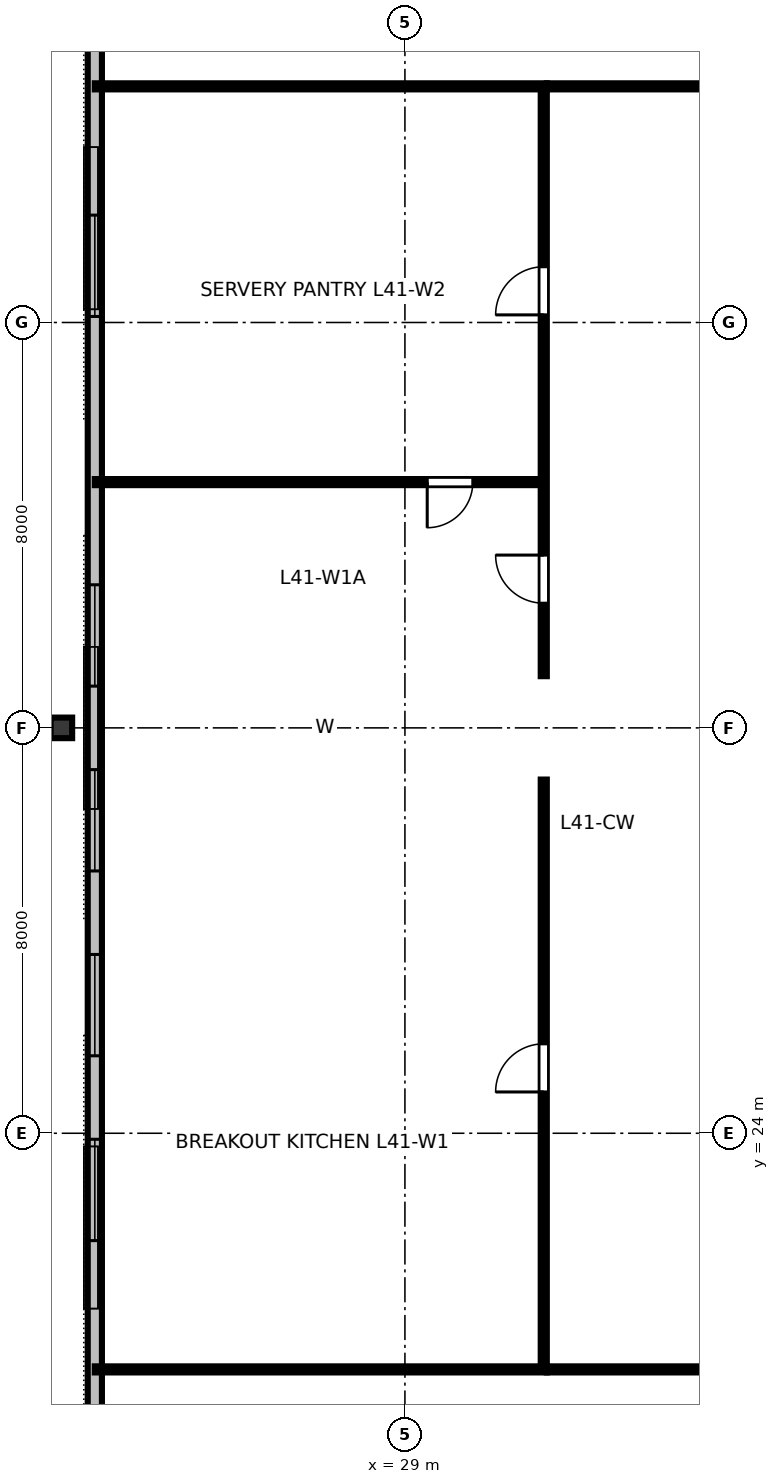
"""IFC4 building model, lengths in metres.
Left out: names, types, materials, properties, quantities, classifications, styles, units other than length and angle.
Written with IfcOpenShell. Run it as: python <this file> out.ifc"""

import sys

from ifc_helpers import new_model, si_unit, direction, frame, frame_2d, origin, origin_2d, place, context, subcontext, project, spatial, rectangle, i_section, extrude, element, fill, save


model = new_model("IFC4")
c1 = context("Model", 3, precision=1e-05, world=origin(), true_north=direction((0.0, 1.0)))
c2 = subcontext(c1, "Body", "Model", "MODEL_VIEW")
j1 = project(units=[si_unit("LENGTHUNIT", "METRE"), si_unit("PLANEANGLEUNIT", "RADIAN")], contexts=[c1])
p1 = place(None, origin())
s1 = spatial("IfcSite", under=j1, at=p1, CompositionType="ELEMENT")
p2 = place(p1, origin())
s2 = spatial("IfcBuilding", under=s1, at=p2, CompositionType="ELEMENT")
p3 = place(p2, frame((0.0, 0.0, 156.4)))
s3 = spatial("IfcBuildingStorey", under=s2, at=p3, CompositionType="ELEMENT", Elevation=156.4)
p4 = place(p3, frame((22.22, 32.0, 0.0), z_axis=(-0.088994797504, 0.0, 0.996032090857), x_axis=(0.996032090857, 0.0, 0.088994797504)))
e1 = element("IfcColumn", 1, at=p4, inside=s3, PredefinedType="COLUMN", context=c2, shape_type="SweptSolid", body=[
    extrude(i_section(OverallWidth=0.406, OverallDepth=0.425, WebThickness=0.033, FlangeThickness=0.052, FilletRadius=0.025, at=origin_2d()), origin(), (0.0, 0.0, 1.0), 3.372),
])
p5 = place(p3, frame((22.88, 47.69, 0.0), z_axis=(0.0, 0.0, 1.0), x_axis=(0.0, -1.0, 0.0)))
e2 = element("IfcWall", 2, at=p5, inside=s3, PredefinedType="STANDARD", context=c2, shape_type="SweptSolid", body=[
    extrude(rectangle(XDim=31.38, YDim=0.28, at=frame_2d((15.69, 0.0))), origin(), (0.0, 0.0, 1.0), 3.36),
])
p6 = place(p5, frame((5.571, 0.0, 0.8)))
e3 = element("IfcOpeningElement", 3, at=p6, cuts=e2, PredefinedType="OPENING", context=c2, shape_type="SweptSolid", body=[
    extrude(rectangle(XDim=2.0, YDim=1.95, at=frame_2d((1.0, 0.975))), frame((0.0, 0.15, 0.0), z_axis=(0.0, -1.0, 0.0), x_axis=(1.0, 0.0, 0.0)), (0.0, 0.0, 1.0), 0.3),
])
p7 = place(p5, frame((12.866, 0.0, 0.8)))
e4 = element("IfcOpeningElement", 4, at=p7, cuts=e2, PredefinedType="OPENING", context=c2, shape_type="SweptSolid", body=[
    extrude(rectangle(XDim=2.0, YDim=1.95, at=frame_2d((1.0, 0.975))), frame((0.0, 0.15, 0.0), z_axis=(0.0, -1.0, 0.0), x_axis=(1.0, 0.0, 0.0)), (0.0, 0.0, 1.0), 0.3),
])
p8 = place(p5, frame((16.514, 0.0, 0.8)))
e5 = element("IfcOpeningElement", 5, at=p8, cuts=e2, PredefinedType="OPENING", context=c2, shape_type="SweptSolid", body=[
    extrude(rectangle(XDim=2.0, YDim=1.95, at=frame_2d((1.0, 0.975))), frame((0.0, 0.15, 0.0), z_axis=(0.0, -1.0, 0.0), x_axis=(1.0, 0.0, 0.0)), (0.0, 0.0, 1.0), 0.3),
])
p9 = place(p5, frame((20.161, 0.0, 0.8)))
e6 = element("IfcOpeningElement", 6, at=p9, cuts=e2, PredefinedType="OPENING", context=c2, shape_type="SweptSolid", body=[
    extrude(rectangle(XDim=2.0, YDim=1.95, at=frame_2d((1.0, 0.975))), frame((0.0, 0.15, 0.0), z_axis=(0.0, -1.0, 0.0), x_axis=(1.0, 0.0, 0.0)), (0.0, 0.0, 1.0), 0.3),
])
p10 = place(p5, frame((23.809, 0.0, 0.8)))
e7 = element("IfcOpeningElement", 7, at=p10, cuts=e2, PredefinedType="OPENING", context=c2, shape_type="SweptSolid", body=[
    extrude(rectangle(XDim=2.0, YDim=1.95, at=frame_2d((1.0, 0.975))), frame((0.0, 0.15, 0.0), z_axis=(0.0, -1.0, 0.0), x_axis=(1.0, 0.0, 0.0)), (0.0, 0.0, 1.0), 0.3),
])
p11 = place(p3, frame((31.8, 19.34, 0.0), z_axis=(0.0, 0.0, 1.0), x_axis=(1.0, 0.0, 0.0)))
e8 = element("IfcWall", 8, at=p11, inside=s3, PredefinedType="PARTITIONING", context=c2, shape_type="SweptSolid", body=[
    extrude(rectangle(XDim=28.4, YDim=0.12, at=frame_2d((14.2, 0.0))), origin(), (0.0, 0.0, 1.0), 2.64),
])
p12 = place(p11, frame((4.789, 0.0, 0.0)))
e9 = element("IfcOpeningElement", 9, at=p12, cuts=e8, PredefinedType="OPENING", context=c2, shape_type="SweptSolid", body=[
    extrude(rectangle(XDim=0.95, YDim=2.15, at=frame_2d((0.475, 1.075))), frame((0.0, 0.07, 0.0), z_axis=(0.0, -1.0, 0.0), x_axis=(1.0, 0.0, 0.0)), (0.0, 0.0, 1.0), 0.14),
])
p13 = place(p11, frame((12.708, 0.0, 0.0)))
e10 = element("IfcOpeningElement", 10, at=p13, cuts=e8, PredefinedType="OPENING", context=c2, shape_type="SweptSolid", body=[
    extrude(rectangle(XDim=0.95, YDim=2.15, at=frame_2d((0.475, 1.075))), frame((0.0, 0.07, 0.0), z_axis=(0.0, -1.0, 0.0), x_axis=(1.0, 0.0, 0.0)), (0.0, 0.0, 1.0), 0.14),
])
p14 = place(p11, frame((21.645, 0.0, 0.0)))
e11 = element("IfcOpeningElement", 11, at=p14, cuts=e8, PredefinedType="OPENING", context=c2, shape_type="SweptSolid", body=[
    extrude(rectangle(XDim=0.95, YDim=2.15, at=frame_2d((0.475, 1.075))), frame((0.0, 0.07, 0.0), z_axis=(0.0, -1.0, 0.0), x_axis=(1.0, 0.0, 0.0)), (0.0, 0.0, 1.0), 0.14),
])
p15 = place(p3, frame((31.8, 44.66, 0.0), z_axis=(0.0, 0.0, 1.0), x_axis=(1.0, 0.0, 0.0)))
e12 = element("IfcWall", 12, at=p15, inside=s3, PredefinedType="PARTITIONING", context=c2, shape_type="SweptSolid", body=[
    extrude(rectangle(XDim=28.4, YDim=0.12, at=frame_2d((14.2, 0.0))), origin(), (0.0, 0.0, 1.0), 2.64),
])
p16 = place(p15, frame((4.036, 0.0, 0.0)))
e13 = element("IfcOpeningElement", 13, at=p16, cuts=e12, PredefinedType="OPENING", context=c2, shape_type="SweptSolid", body=[
    extrude(rectangle(XDim=0.95, YDim=2.15, at=frame_2d((0.475, 1.075))), frame((0.0, 0.07, 0.0), z_axis=(0.0, -1.0, 0.0), x_axis=(1.0, 0.0, 0.0)), (0.0, 0.0, 1.0), 0.14),
])
p17 = place(p15, frame((12.256, 0.0, 0.0)))
e14 = element("IfcOpeningElement", 14, at=p17, cuts=e12, PredefinedType="OPENING", context=c2, shape_type="SweptSolid", body=[
    extrude(rectangle(XDim=0.95, YDim=2.15, at=frame_2d((0.475, 1.075))), frame((0.0, 0.07, 0.0), z_axis=(0.0, -1.0, 0.0), x_axis=(1.0, 0.0, 0.0)), (0.0, 0.0, 1.0), 0.14),
])
p18 = place(p15, frame((18.246, 0.0, 0.0)))
e15 = element("IfcOpeningElement", 15, at=p18, cuts=e12, PredefinedType="OPENING", context=c2, shape_type="SweptSolid", body=[
    extrude(rectangle(XDim=0.95, YDim=2.15, at=frame_2d((0.475, 1.075))), frame((0.0, 0.07, 0.0), z_axis=(0.0, -1.0, 0.0), x_axis=(1.0, 0.0, 0.0)), (0.0, 0.0, 1.0), 0.14),
])
p19 = place(p15, frame((24.086, 0.0, 0.0)))
e16 = element("IfcOpeningElement", 16, at=p19, cuts=e12, PredefinedType="OPENING", context=c2, shape_type="SweptSolid", body=[
    extrude(rectangle(XDim=0.95, YDim=2.15, at=frame_2d((0.475, 1.075))), frame((0.0, 0.07, 0.0), z_axis=(0.0, -1.0, 0.0), x_axis=(1.0, 0.0, 0.0)), (0.0, 0.0, 1.0), 0.14),
])
p20 = place(p3, frame((31.74, 36.85, 0.0), z_axis=(0.0, 0.0, 1.0), x_axis=(-1.0, 0.0, 0.0)))
e17 = element("IfcWall", 17, at=p20, inside=s3, PredefinedType="PARTITIONING", context=c2, shape_type="SweptSolid", body=[
    extrude(rectangle(XDim=8.86, YDim=0.12, at=frame_2d((4.43, 0.0))), origin(), (0.0, 0.0, 1.0), 2.64),
])
p21 = place(p20, frame((1.4, 0.0, 0.0)))
e18 = element("IfcOpeningElement", 18, at=p21, cuts=e17, PredefinedType="OPENING", context=c2, shape_type="SweptSolid", body=[
    extrude(rectangle(XDim=0.9, YDim=2.15, at=frame_2d((0.45, 1.075))), frame((0.0, 0.07, 0.0), z_axis=(0.0, -1.0, 0.0), x_axis=(1.0, 0.0, 0.0)), (0.0, 0.0, 1.0), 0.14),
])
p22 = place(p3, frame((31.74, 19.4, 0.0), z_axis=(0.0, 0.0, 1.0), x_axis=(0.0, 1.0, 0.0)))
e19 = element("IfcWall", 19, at=p22, inside=s3, PredefinedType="PARTITIONING", context=c2, shape_type="SweptSolid", body=[
    extrude(rectangle(XDim=11.58, YDim=0.12, at=frame_2d((5.79, 0.0))), origin(), (0.0, 0.0, 1.0), 2.64),
])
p23 = place(p22, frame((5.415, 0.0, 0.0)))
e20 = element("IfcOpeningElement", 20, at=p23, cuts=e19, PredefinedType="OPENING", context=c2, shape_type="SweptSolid", body=[
    extrude(rectangle(XDim=0.95, YDim=2.15, at=frame_2d((0.475, 1.075))), frame((0.0, 0.07, 0.0), z_axis=(0.0, -1.0, 0.0), x_axis=(1.0, 0.0, 0.0)), (0.0, 0.0, 1.0), 0.14),
])
p24 = place(p3, frame((31.74, 33.02, 0.0), z_axis=(0.0, 0.0, 1.0), x_axis=(0.0, 1.0, 0.0)))
e21 = element("IfcWall", 21, at=p24, inside=s3, PredefinedType="PARTITIONING", context=c2, shape_type="SweptSolid", body=[
    extrude(rectangle(XDim=11.58, YDim=0.12, at=frame_2d((5.79, 0.0))), origin(), (0.0, 0.0, 1.0), 2.64),
])
p25 = place(p24, frame((1.44, 0.0, 0.0)))
e22 = element("IfcOpeningElement", 22, at=p25, cuts=e21, PredefinedType="OPENING", context=c2, shape_type="SweptSolid", body=[
    extrude(rectangle(XDim=0.95, YDim=2.15, at=frame_2d((0.475, 1.075))), frame((0.0, 0.07, 0.0), z_axis=(0.0, -1.0, 0.0), x_axis=(1.0, 0.0, 0.0)), (0.0, 0.0, 1.0), 0.14),
])
p26 = place(p24, frame((7.13, 0.0, 0.0)))
e23 = element("IfcOpeningElement", 23, at=p26, cuts=e21, PredefinedType="OPENING", context=c2, shape_type="SweptSolid", body=[
    extrude(rectangle(XDim=0.95, YDim=2.15, at=frame_2d((0.475, 1.075))), frame((0.0, 0.07, 0.0), z_axis=(0.0, -1.0, 0.0), x_axis=(1.0, 0.0, 0.0)), (0.0, 0.0, 1.0), 0.14),
])
for number, where, z_axis, x_axis in (
    (24, (31.8, 19.34, 0.0), (0.0, 0.0, 1.0), (-1.0, 0.0, 0.0)),
    (25, (31.8, 44.66, 0.0), (0.0, 0.0, 1.0), (-1.0, 0.0, 0.0)),
):
    element("IfcWall", number, at=place(p3, frame(where, z_axis=z_axis, x_axis=x_axis)), inside=s3, PredefinedType="PARTITIONING", context=c2, shape_type="SweptSolid", body=[
        extrude(rectangle(XDim=8.92, YDim=0.12, at=frame_2d((4.46, 0.0))), origin(), (0.0, 0.0, 1.0), 2.64),
    ])
p27 = place(p6, origin())
e26 = element("IfcWindow", 26, at=p27, inside=s3, PartitioningType="SINGLE_PANEL", PredefinedType="WINDOW", context=c2, shape_type="SweptSolid", body=[
    extrude(rectangle(XDim=2.0, YDim=1.95, at=frame_2d((1.0, 0.975))), frame((0.0, 0.03, 0.0), z_axis=(0.0, -1.0, 0.0), x_axis=(1.0, 0.0, 0.0)), (0.0, 0.0, 1.0), 0.06),
])
fill(e3, e26)
p28 = place(p7, origin())
e27 = element("IfcWindow", 27, at=p28, inside=s3, PartitioningType="SINGLE_PANEL", PredefinedType="WINDOW", context=c2, shape_type="SweptSolid", body=[
    extrude(rectangle(XDim=2.0, YDim=1.95, at=frame_2d((1.0, 0.975))), frame((0.0, 0.03, 0.0), z_axis=(0.0, -1.0, 0.0), x_axis=(1.0, 0.0, 0.0)), (0.0, 0.0, 1.0), 0.06),
])
fill(e4, e27)
p29 = place(p8, origin())
e28 = element("IfcWindow", 28, at=p29, inside=s3, PartitioningType="SINGLE_PANEL", PredefinedType="WINDOW", context=c2, shape_type="SweptSolid", body=[
    extrude(rectangle(XDim=2.0, YDim=1.95, at=frame_2d((1.0, 0.975))), frame((0.0, 0.03, 0.0), z_axis=(0.0, -1.0, 0.0), x_axis=(1.0, 0.0, 0.0)), (0.0, 0.0, 1.0), 0.06),
])
fill(e5, e28)
p30 = place(p9, origin())
e29 = element("IfcWindow", 29, at=p30, inside=s3, PartitioningType="SINGLE_PANEL", PredefinedType="WINDOW", context=c2, shape_type="SweptSolid", body=[
    extrude(rectangle(XDim=2.0, YDim=1.95, at=frame_2d((1.0, 0.975))), frame((0.0, 0.03, 0.0), z_axis=(0.0, -1.0, 0.0), x_axis=(1.0, 0.0, 0.0)), (0.0, 0.0, 1.0), 0.06),
])
fill(e6, e29)
p31 = place(p10, origin())
e30 = element("IfcWindow", 30, at=p31, inside=s3, PartitioningType="SINGLE_PANEL", PredefinedType="WINDOW", context=c2, shape_type="SweptSolid", body=[
    extrude(rectangle(XDim=2.0, YDim=1.95, at=frame_2d((1.0, 0.975))), frame((0.0, 0.03, 0.0), z_axis=(0.0, -1.0, 0.0), x_axis=(1.0, 0.0, 0.0)), (0.0, 0.0, 1.0), 0.06),
])
fill(e7, e30)
p32 = place(p21, origin())
e31 = element("IfcDoor", 31, at=p32, inside=s3, OperationType="SINGLE_SWING_RIGHT", PredefinedType="DOOR", context=c2, shape_type="SweptSolid", body=[
    extrude(rectangle(XDim=0.9, YDim=2.15, at=frame_2d((0.45, 1.075))), frame((0.0, 0.025, 0.0), z_axis=(0.0, -1.0, 0.0), x_axis=(1.0, 0.0, 0.0)), (0.0, 0.0, 1.0), 0.05),
])
fill(e18, e31)
p33 = place(p23, origin())
e32 = element("IfcDoor", 32, at=p33, inside=s3, OperationType="SINGLE_SWING_LEFT", PredefinedType="DOOR", context=c2, shape_type="SweptSolid", body=[
    extrude(rectangle(XDim=0.95, YDim=2.15, at=frame_2d((0.475, 1.075))), frame((0.0, 0.025, 0.0), z_axis=(0.0, -1.0, 0.0), x_axis=(1.0, 0.0, 0.0)), (0.0, 0.0, 1.0), 0.05),
])
fill(e20, e32)
p34 = place(p25, origin())
e33 = element("IfcDoor", 33, at=p34, inside=s3, OperationType="SINGLE_SWING_RIGHT", PredefinedType="DOOR", context=c2, shape_type="SweptSolid", body=[
    extrude(rectangle(XDim=0.95, YDim=2.15, at=frame_2d((0.475, 1.075))), frame((0.0, 0.025, 0.0), z_axis=(0.0, -1.0, 0.0), x_axis=(1.0, 0.0, 0.0)), (0.0, 0.0, 1.0), 0.05),
])
fill(e22, e33)
p35 = place(p26, origin())
e34 = element("IfcDoor", 34, at=p35, inside=s3, OperationType="SINGLE_SWING_LEFT", PredefinedType="DOOR", context=c2, shape_type="SweptSolid", body=[
    extrude(rectangle(XDim=0.95, YDim=2.15, at=frame_2d((0.475, 1.075))), frame((0.0, 0.025, 0.0), z_axis=(0.0, -1.0, 0.0), x_axis=(1.0, 0.0, 0.0)), (0.0, 0.0, 1.0), 0.05),
])
fill(e23, e34)
save(model, sys.argv[1])
